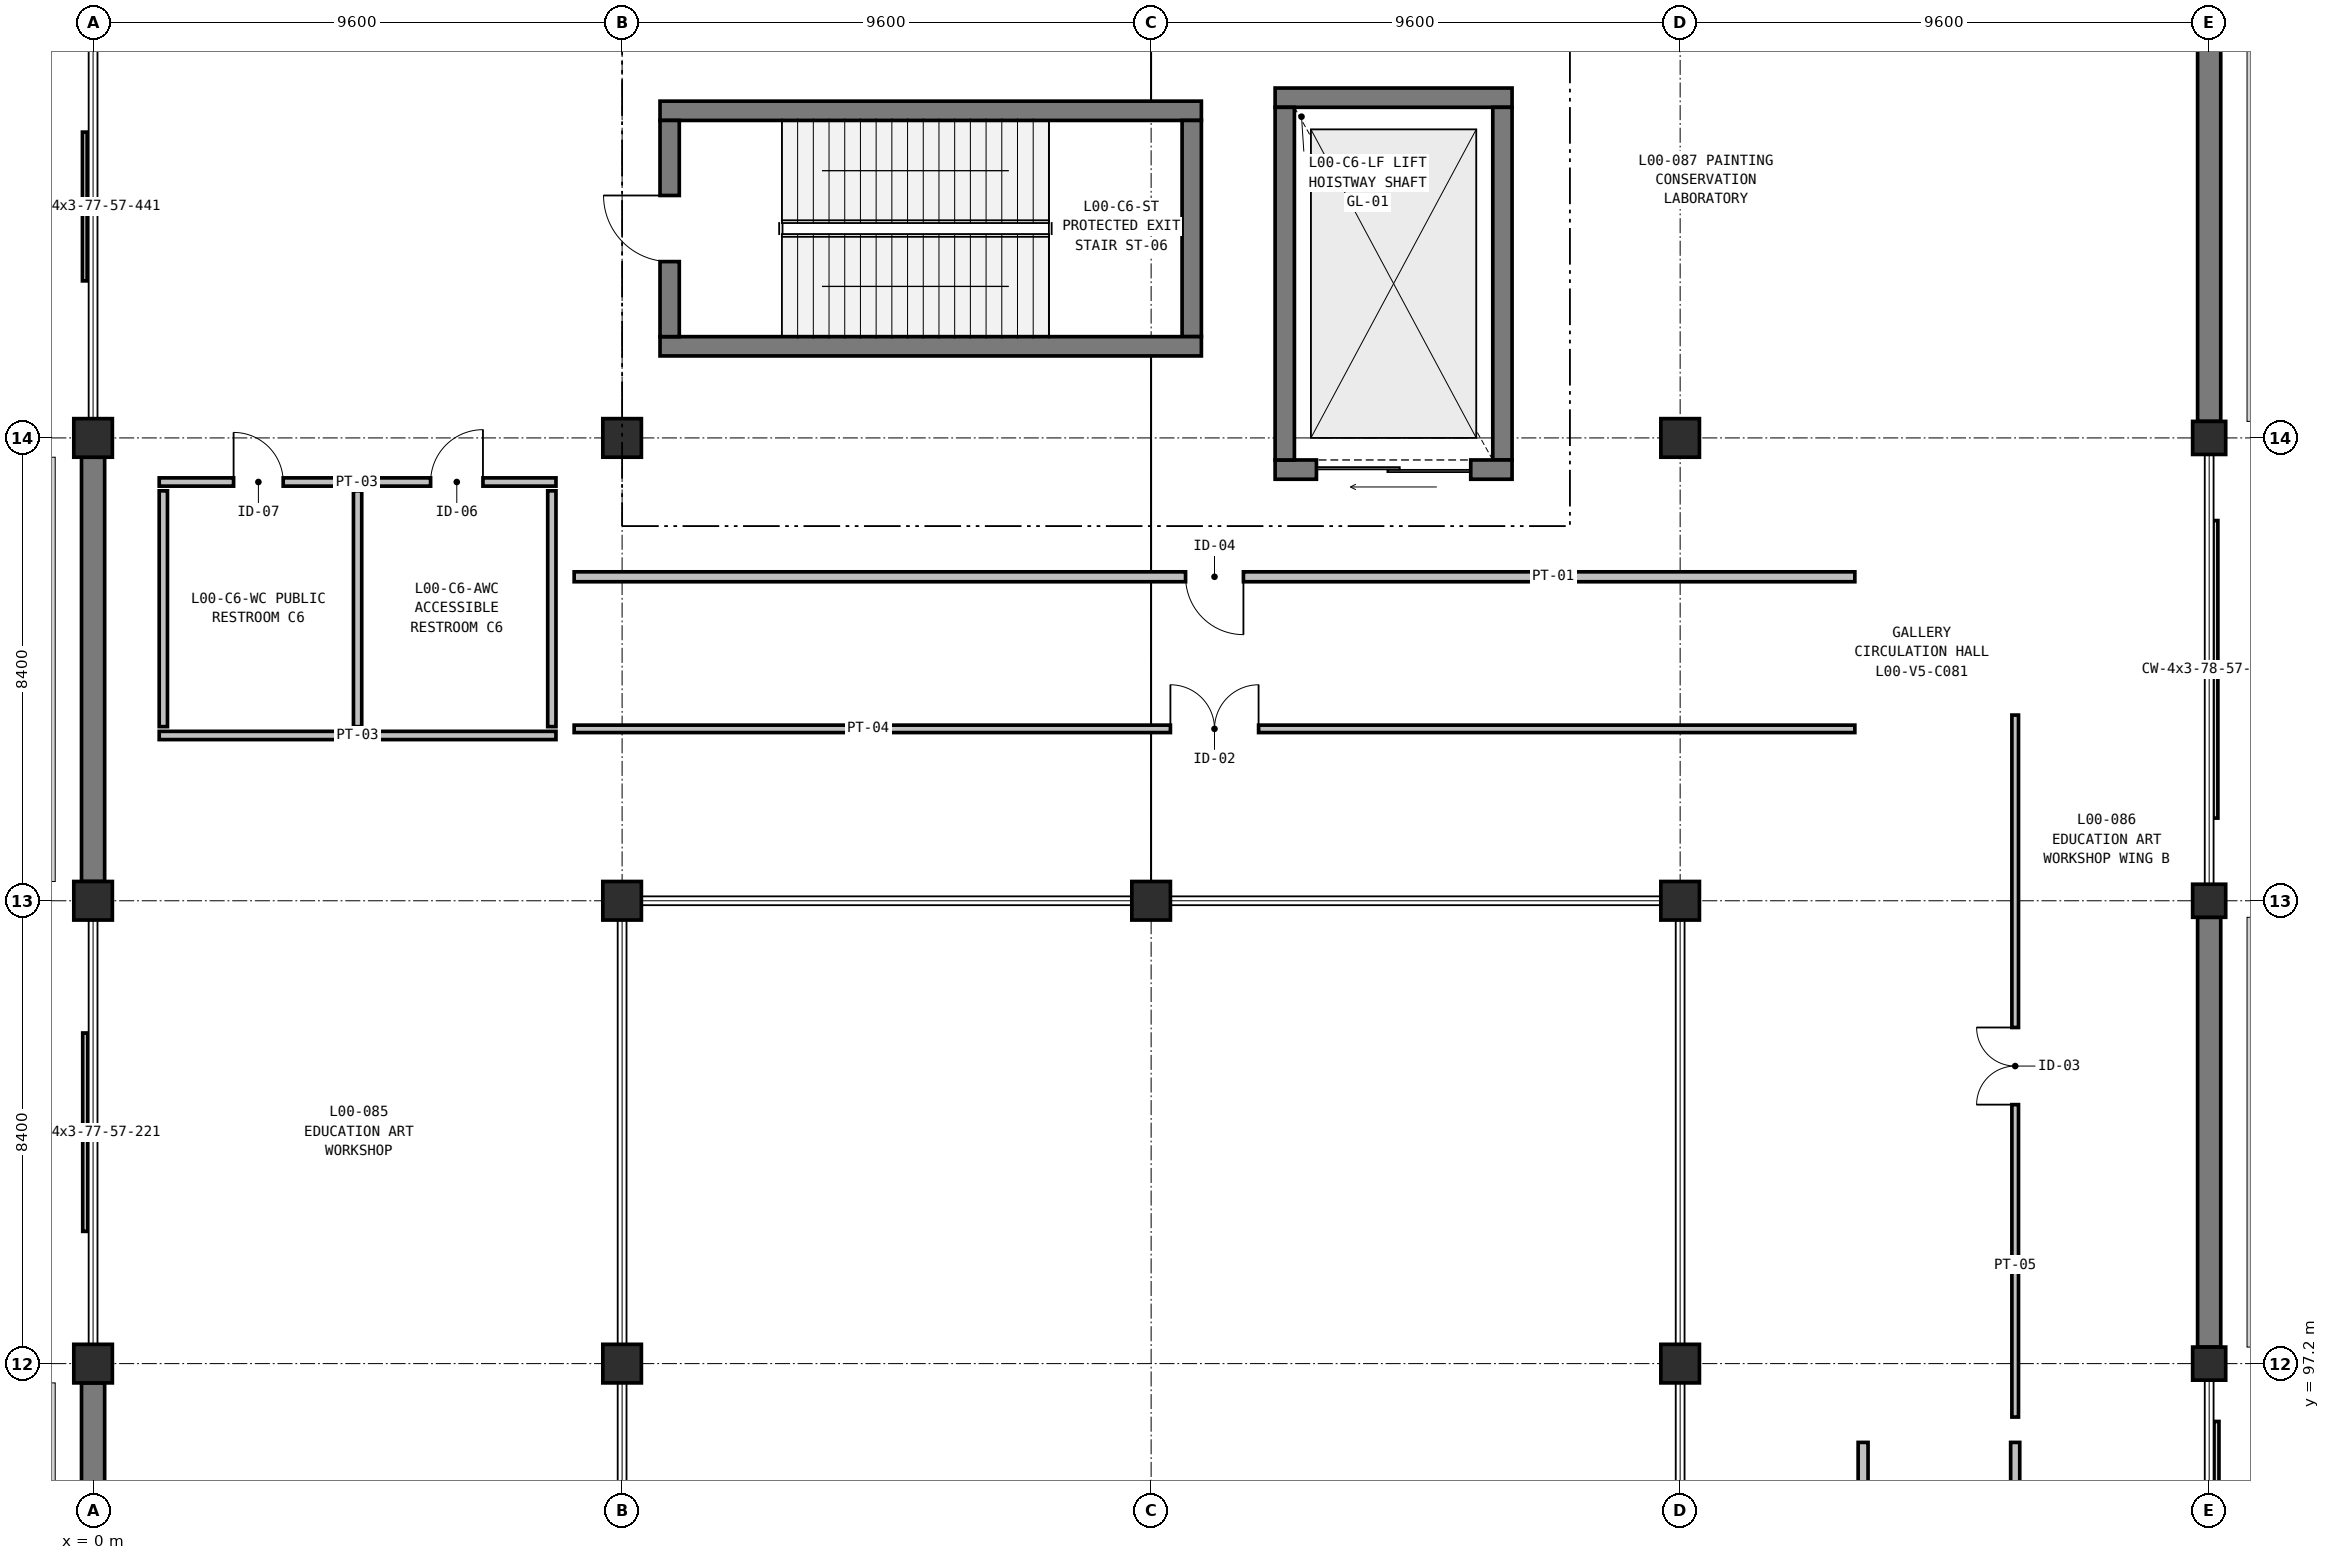
"""IFC4 building model, lengths in metres.
Left out: names, types, materials, properties, quantities, classifications, styles, units other than length and angle.
Written with IfcOpenShell. Run it as: python <this file> out.ifc"""

import sys

from ifc_helpers import new_model, si_unit, direction, frame, frame_2d, origin, origin_2d, place, context, subcontext, project, spatial, rectangle, extrude, element, fill, save


model = new_model("IFC4")
c1 = context("Model", 3, precision=1e-05, world=origin(), true_north=direction((0.0, 1.0)))
c2 = subcontext(c1, "Body", "Model", "MODEL_VIEW")
j1 = project(units=[si_unit("LENGTHUNIT", "METRE"), si_unit("PLANEANGLEUNIT", "RADIAN")], contexts=[c1])
p1 = place(None, origin())
s1 = spatial("IfcSite", under=j1, at=p1, CompositionType="ELEMENT")
p2 = place(p1, origin())
s2 = spatial("IfcBuilding", under=s1, at=p2, CompositionType="ELEMENT")
p3 = place(p2, origin())
s3 = spatial("IfcBuildingStorey", under=s2, at=p3, CompositionType="ELEMENT", Elevation=0.0)
for number, where, z_axis, x_axis in (
    (1, (0.0, 97.2, 0.0), (0.0, 0.0, 1.0), (1.0, 0.0, 0.0)),
    (2, (0.0, 105.6, 0.0), (0.0, 0.0, 1.0), (1.0, 0.0, 0.0)),
    (3, (0.0, 114.0, 0.0), (0.0, 0.0, 1.0), (1.0, 0.0, 0.0)),
    (4, (9.6, 97.2, 0.0), (0.0, 0.0, 1.0), (1.0, 0.0, 0.0)),
    (5, (9.6, 105.6, 0.0), (0.0, 0.0, 1.0), (1.0, 0.0, 0.0)),
    (6, (9.6, 114.0, 0.0), (0.0, 0.0, 1.0), (1.0, 0.0, 0.0)),
    (7, (19.2, 105.6, 0.0), (0.0, 0.0, 1.0), (1.0, 0.0, 0.0)),
    (8, (28.8, 97.2, 0.0), (0.0, 0.0, 1.0), (1.0, 0.0, 0.0)),
    (9, (28.8, 105.6, 0.0), (0.0, 0.0, 1.0), (1.0, 0.0, 0.0)),
    (10, (28.8, 114.0, 0.0), (0.0, 0.0, 1.0), (1.0, 0.0, 0.0)),
):
    element("IfcColumn", number, at=place(p3, frame(where, z_axis=z_axis, x_axis=x_axis)), inside=s3, PredefinedType="COLUMN", context=c2, shape_type="SweptSolid", body=[
        extrude(rectangle(XDim=0.7, YDim=0.7, at=origin_2d()), origin(), (0.0, 0.0, 1.0), 6.0),
    ])
for number, where, z_axis, x_axis in (
    (11, (38.4, 97.2, 0.0), (0.0, 0.0, 1.0), (1.0, 0.0, 0.0)),
    (12, (38.4, 105.6, 0.0), (0.0, 0.0, 1.0), (1.0, 0.0, 0.0)),
    (13, (38.4, 114.0, 0.0), (0.0, 0.0, 1.0), (1.0, 0.0, 0.0)),
):
    element("IfcColumn", number, at=place(p3, frame(where, z_axis=z_axis, x_axis=x_axis)), inside=s3, PredefinedType="COLUMN", context=c2, shape_type="SweptSolid", body=[
        extrude(rectangle(XDim=0.6, YDim=0.6, at=origin_2d()), origin(), (0.0, 0.0, 1.0), 6.0),
    ])
for number, where, z_axis, x_axis in (
    (14, (38.4, 122.1, 0.0), (0.0, 0.0, 1.0), (0.0, -1.0, 0.0)),
    (15, (38.4, 105.3, 0.0), (0.0, 0.0, 1.0), (0.0, -1.0, 0.0)),
):
    element("IfcWall", number, at=place(p3, frame(where, z_axis=z_axis, x_axis=x_axis)), inside=s3, PredefinedType="SOLIDWALL", context=c2, shape_type="SweptSolid", body=[
        extrude(rectangle(XDim=7.8, YDim=0.42, at=frame_2d((3.9, 0.0))), origin(), (0.0, 0.0, 1.0), 5.68),
    ])
p4 = place(p3, frame((0.0, 89.15, 0.0), z_axis=(0.0, 0.0, 1.0), x_axis=(0.0, 1.0, 0.0)))
e16 = element("IfcWall", 16, at=p4, inside=s3, PredefinedType="SOLIDWALL", context=c2, shape_type="SweptSolid", body=[
    extrude(rectangle(XDim=7.7, YDim=0.42, at=frame_2d((3.85, 0.0))), origin(), (0.0, 0.0, 1.0), 5.68),
])
p5 = place(p3, frame((0.0, 105.95, 0.0), z_axis=(0.0, 0.0, 1.0), x_axis=(0.0, 1.0, 0.0)))
e17 = element("IfcWall", 17, at=p5, inside=s3, PredefinedType="SOLIDWALL", context=c2, shape_type="SweptSolid", body=[
    extrude(rectangle(XDim=7.7, YDim=0.42, at=frame_2d((3.85, 0.0))), origin(), (0.0, 0.0, 1.0), 5.68),
])
p6 = place(p3, frame((10.288, 119.937, 0.0), z_axis=(0.0, 0.0, 1.0), x_axis=(1.0, 0.0, 0.0)))
e18 = element("IfcWall", 18, at=p6, inside=s3, PredefinedType="SHEAR", context=c2, shape_type="SweptSolid", body=[
    extrude(rectangle(XDim=9.824, YDim=0.35, at=frame_2d((4.912, 0.0))), origin(), (0.0, 0.0, 1.0), 5.68),
])
p7 = place(p3, frame((19.937, 119.762, 0.0), z_axis=(0.0, 0.0, 1.0), x_axis=(0.0, -1.0, 0.0)))
e19 = element("IfcWall", 19, at=p7, inside=s3, PredefinedType="SHEAR", context=c2, shape_type="SweptSolid", body=[
    extrude(rectangle(XDim=3.924, YDim=0.35, at=frame_2d((1.962, 0.0))), origin(), (0.0, 0.0, 1.0), 5.68),
])
p8 = place(p3, frame((20.112, 115.663, 0.0), z_axis=(0.0, 0.0, 1.0), x_axis=(-1.0, 0.0, 0.0)))
e20 = element("IfcWall", 20, at=p8, inside=s3, PredefinedType="SHEAR", context=c2, shape_type="SweptSolid", body=[
    extrude(rectangle(XDim=9.824, YDim=0.35, at=frame_2d((4.912, 0.0))), origin(), (0.0, 0.0, 1.0), 5.68),
])
p9 = place(p3, frame((10.463, 115.838, 0.0), z_axis=(0.0, 0.0, 1.0), x_axis=(0.0, 1.0, 0.0)))
e21 = element("IfcWall", 21, at=p9, inside=s3, PredefinedType="SHEAR", context=c2, shape_type="SweptSolid", body=[
    extrude(rectangle(XDim=3.924, YDim=0.35, at=frame_2d((1.962, 0.0))), origin(), (0.0, 0.0, 1.0), 5.68),
])
p10 = place(p9, frame((1.362, 0.0, 0.0)))
e22 = element("IfcOpeningElement", 22, at=p10, cuts=e21, PredefinedType="OPENING", context=c2, shape_type="SweptSolid", body=[
    extrude(rectangle(XDim=1.2, YDim=2.2, at=frame_2d((0.6, 1.1))), frame((0.0, 0.185, 0.0), z_axis=(0.0, -1.0, 0.0), x_axis=(1.0, 0.0, 0.0)), (0.0, 0.0, 1.0), 0.37),
])
p11 = place(p3, frame((21.45, 120.175, 0.0), z_axis=(0.0, 0.0, 1.0), x_axis=(1.0, 0.0, 0.0)))
e23 = element("IfcWall", 23, at=p11, inside=s3, PredefinedType="SHEAR", context=c2, shape_type="SweptSolid", body=[
    extrude(rectangle(XDim=4.3, YDim=0.35, at=frame_2d((2.15, 0.0))), origin(), (0.0, 0.0, 1.0), 5.68),
])
p12 = place(p3, frame((25.575, 120.0, 0.0), z_axis=(0.0, 0.0, 1.0), x_axis=(0.0, -1.0, 0.0)))
e24 = element("IfcWall", 24, at=p12, inside=s3, PredefinedType="SHEAR", context=c2, shape_type="SweptSolid", body=[
    extrude(rectangle(XDim=6.4, YDim=0.35, at=frame_2d((3.2, 0.0))), origin(), (0.0, 0.0, 1.0), 5.68),
])
p13 = place(p3, frame((25.75, 113.425, 0.0), z_axis=(0.0, 0.0, 1.0), x_axis=(-1.0, 0.0, 0.0)))
e25 = element("IfcWall", 25, at=p13, inside=s3, PredefinedType="SHEAR", context=c2, shape_type="SweptSolid", body=[
    extrude(rectangle(XDim=4.3, YDim=0.35, at=frame_2d((2.15, 0.0))), origin(), (0.0, 0.0, 1.0), 5.68),
])
p14 = place(p13, frame((0.75, 0.0, 0.0)))
e26 = element("IfcOpeningElement", 26, at=p14, cuts=e25, PredefinedType="OPENING", context=c2, shape_type="SweptSolid", body=[
    extrude(rectangle(XDim=2.8, YDim=2.7, at=frame_2d((1.4, 1.35))), frame((0.0, 0.185, 0.0), z_axis=(0.0, -1.0, 0.0), x_axis=(1.0, 0.0, 0.0)), (0.0, 0.0, 1.0), 0.37),
])
p15 = place(p3, frame((21.625, 113.6, 0.0), z_axis=(0.0, 0.0, 1.0), x_axis=(0.0, 1.0, 0.0)))
e27 = element("IfcWall", 27, at=p15, inside=s3, PredefinedType="SHEAR", context=c2, shape_type="SweptSolid", body=[
    extrude(rectangle(XDim=6.4, YDim=0.35, at=frame_2d((3.2, 0.0))), origin(), (0.0, 0.0, 1.0), 5.68),
])
p16 = place(p3, frame((1.2, 113.2, 0.0), z_axis=(0.0, 0.0, 1.0), x_axis=(1.0, 0.0, 0.0)))
e28 = element("IfcWall", 28, at=p16, inside=s3, PredefinedType="PARTITIONING", context=c2, shape_type="SweptSolid", body=[
    extrude(rectangle(XDim=7.2, YDim=0.15, at=frame_2d((3.6, 0.0))), origin(), (0.0, 0.0, 1.0), 5.68),
])
p17 = place(p16, frame((1.35, 0.0, 0.0)))
e29 = element("IfcOpeningElement", 29, at=p17, cuts=e28, PredefinedType="OPENING", context=c2, shape_type="SweptSolid", body=[
    extrude(rectangle(XDim=0.9, YDim=2.1, at=frame_2d((0.45, 1.05))), frame((0.0, 0.085, 0.0), z_axis=(0.0, -1.0, 0.0), x_axis=(1.0, 0.0, 0.0)), (0.0, 0.0, 1.0), 0.17),
])
p18 = place(p16, frame((4.925, 0.0, 0.0)))
e30 = element("IfcOpeningElement", 30, at=p18, cuts=e28, PredefinedType="OPENING", context=c2, shape_type="SweptSolid", body=[
    extrude(rectangle(XDim=0.95, YDim=2.15, at=frame_2d((0.475, 1.075))), frame((0.0, 0.085, 0.0), z_axis=(0.0, -1.0, 0.0), x_axis=(1.0, 0.0, 0.0)), (0.0, 0.0, 1.0), 0.17),
])
p19 = place(p3, frame((1.2, 108.6, 0.0), z_axis=(0.0, 0.0, 1.0), x_axis=(1.0, 0.0, 0.0)))
e31 = element("IfcWall", 31, at=p19, inside=s3, PredefinedType="PARTITIONING", context=c2, shape_type="SweptSolid", body=[
    extrude(rectangle(XDim=7.2, YDim=0.15, at=frame_2d((3.6, 0.0))), origin(), (0.0, 0.0, 1.0), 5.68),
])
for number, where, z_axis, x_axis in (
    (32, (1.275, 108.76, 0.0), (0.0, 0.0, 1.0), (0.0, 1.0, 0.0)),
    (33, (4.8, 108.76, 0.0), (0.0, 0.0, 1.0), (0.0, 1.0, 0.0)),
    (34, (8.325, 108.76, 0.0), (0.0, 0.0, 1.0), (0.0, 1.0, 0.0)),
):
    element("IfcWall", number, at=place(p3, frame(where, z_axis=z_axis, x_axis=x_axis)), inside=s3, PredefinedType="PARTITIONING", context=c2, shape_type="SweptSolid", body=[
        extrude(rectangle(XDim=4.28, YDim=0.15, at=frame_2d((2.14, 0.0))), origin(), (0.0, 0.0, 1.0), 5.055),
    ])
p20 = place(p3, frame((32.12, 95.77, 0.0), z_axis=(0.0, 0.0, 1.0), x_axis=(0.0, -1.0, 0.0)))
e35 = element("IfcWall", 35, at=p20, inside=s3, PredefinedType="PARTITIONING", context=c2, shape_type="SweptSolid", body=[
    extrude(rectangle(XDim=12.74, YDim=0.18, at=frame_2d((6.37, 0.0))), origin(), (0.0, 0.0, 1.0), 4.905),
])
p21 = place(p20, frame((5.795, 0.0, 0.0)))
e36 = element("IfcOpeningElement", 36, at=p21, cuts=e35, PredefinedType="OPENING", context=c2, shape_type="SweptSolid", body=[
    extrude(rectangle(XDim=1.15, YDim=2.2, at=frame_2d((0.575, 1.1))), frame((0.0, 0.1, 0.0), z_axis=(0.0, -1.0, 0.0), x_axis=(1.0, 0.0, 0.0)), (0.0, 0.0, 1.0), 0.2),
])
p22 = place(p3, frame((34.88, 83.03, 0.0), z_axis=(0.0, 0.0, 1.0), x_axis=(0.0, 1.0, 0.0)))
e37 = element("IfcWall", 37, at=p22, inside=s3, PredefinedType="PARTITIONING", context=c2, shape_type="SweptSolid", body=[
    extrude(rectangle(XDim=12.74, YDim=0.165, at=frame_2d((6.37, 0.0))), origin(), (0.0, 0.0, 1.0), 4.905),
])
p23 = place(p22, frame((5.47, 0.0, 0.0)))
e38 = element("IfcOpeningElement", 38, at=p23, cuts=e37, PredefinedType="OPENING", context=c2, shape_type="SweptSolid", body=[
    extrude(rectangle(XDim=1.8, YDim=2.4, at=frame_2d((0.9, 1.2))), frame((0.0, 0.093, 0.0), z_axis=(0.0, -1.0, 0.0), x_axis=(1.0, 0.0, 0.0)), (0.0, 0.0, 1.0), 0.185),
])
p24 = place(p3, frame((8.73, 108.72, 0.0), z_axis=(0.0, 0.0, 1.0), x_axis=(1.0, 0.0, 0.0)))
e39 = element("IfcWall", 39, at=p24, inside=s3, PredefinedType="PARTITIONING", context=c2, shape_type="SweptSolid", body=[
    extrude(rectangle(XDim=23.24, YDim=0.135, at=frame_2d((11.62, 0.0))), origin(), (0.0, 0.0, 1.0), 4.955),
])
p25 = place(p24, frame((10.82, 0.0, 0.0)))
e40 = element("IfcOpeningElement", 40, at=p25, cuts=e39, PredefinedType="OPENING", context=c2, shape_type="SweptSolid", body=[
    extrude(rectangle(XDim=1.6, YDim=2.35, at=frame_2d((0.8, 1.175))), frame((0.0, 0.077, 0.0), z_axis=(0.0, -1.0, 0.0), x_axis=(1.0, 0.0, 0.0)), (0.0, 0.0, 1.0), 0.155),
])
p26 = place(p3, frame((34.88, 96.23, 0.0), z_axis=(0.0, 0.0, 1.0), x_axis=(0.0, 1.0, 0.0)))
e41 = element("IfcWall", 41, at=p26, inside=s3, PredefinedType="PARTITIONING", context=c2, shape_type="SweptSolid", body=[
    extrude(rectangle(XDim=12.74, YDim=0.12, at=frame_2d((6.37, 0.0))), origin(), (0.0, 0.0, 1.0), 4.905),
])
p27 = place(p26, frame((5.67, 0.0, 0.0)))
e42 = element("IfcOpeningElement", 42, at=p27, cuts=e41, PredefinedType="OPENING", context=c2, shape_type="SweptSolid", body=[
    extrude(rectangle(XDim=1.4, YDim=2.3, at=frame_2d((0.7, 1.15))), frame((0.0, 0.07, 0.0), z_axis=(0.0, -1.0, 0.0), x_axis=(1.0, 0.0, 0.0)), (0.0, 0.0, 1.0), 0.14),
])
p28 = place(p3, frame((31.97, 111.48, 0.0), z_axis=(0.0, 0.0, 1.0), x_axis=(-1.0, 0.0, 0.0)))
e43 = element("IfcWall", 43, at=p28, inside=s3, PredefinedType="PARTITIONING", context=c2, shape_type="SweptSolid", body=[
    extrude(rectangle(XDim=23.24, YDim=0.18, at=frame_2d((11.62, 0.0))), origin(), (0.0, 0.0, 1.0), 4.955),
])
p29 = place(p28, frame((11.095, 0.0, 0.0)))
e44 = element("IfcOpeningElement", 44, at=p29, cuts=e43, PredefinedType="OPENING", context=c2, shape_type="SweptSolid", body=[
    extrude(rectangle(XDim=1.05, YDim=2.2, at=frame_2d((0.525, 1.1))), frame((0.0, 0.1, 0.0), z_axis=(0.0, -1.0, 0.0), x_axis=(1.0, 0.0, 0.0)), (0.0, 0.0, 1.0), 0.2),
])
p30 = place(p10, origin())
e45 = element("IfcDoor", 45, at=p30, inside=s3, OperationType="SINGLE_SWING_RIGHT", PredefinedType="DOOR", context=c2, shape_type="SweptSolid", body=[
    extrude(rectangle(XDim=1.2, YDim=2.2, at=frame_2d((0.6, 1.1))), frame((0.0, 0.025, 0.0), z_axis=(0.0, -1.0, 0.0), x_axis=(1.0, 0.0, 0.0)), (0.0, 0.0, 1.0), 0.05),
])
fill(e22, e45)
p31 = place(p14, origin())
e46 = element("IfcDoor", 46, at=p31, inside=s3, OperationType="DOUBLE_DOOR_SLIDING", PredefinedType="DOOR", context=c2, shape_type="SweptSolid", body=[
    extrude(rectangle(XDim=2.8, YDim=2.7, at=frame_2d((1.4, 1.35))), frame((0.0, 0.025, 0.0), z_axis=(0.0, -1.0, 0.0), x_axis=(1.0, 0.0, 0.0)), (0.0, 0.0, 1.0), 0.05),
])
fill(e26, e46)
p32 = place(p17, origin())
e47 = element("IfcDoor", 47, at=p32, inside=s3, OperationType="SINGLE_SWING_LEFT", PredefinedType="DOOR", context=c2, shape_type="SweptSolid", body=[
    extrude(rectangle(XDim=0.9, YDim=2.1, at=frame_2d((0.45, 1.05))), frame((0.0, 0.025, 0.0), z_axis=(0.0, -1.0, 0.0), x_axis=(1.0, 0.0, 0.0)), (0.0, 0.0, 1.0), 0.05),
])
fill(e29, e47)
p33 = place(p18, origin())
e48 = element("IfcDoor", 48, at=p33, inside=s3, OperationType="SINGLE_SWING_RIGHT", PredefinedType="DOOR", context=c2, shape_type="SweptSolid", body=[
    extrude(rectangle(XDim=0.95, YDim=2.15, at=frame_2d((0.475, 1.075))), frame((0.0, 0.025, 0.0), z_axis=(0.0, -1.0, 0.0), x_axis=(1.0, 0.0, 0.0)), (0.0, 0.0, 1.0), 0.05),
])
fill(e30, e48)
p34 = place(p25, origin())
e49 = element("IfcDoor", 49, at=p34, inside=s3, OperationType="DOUBLE_DOOR_SINGLE_SWING", PredefinedType="DOOR", context=c2, shape_type="SweptSolid", body=[
    extrude(rectangle(XDim=1.6, YDim=2.35, at=frame_2d((0.8, 1.175))), frame((0.0, 0.025, 0.0), z_axis=(0.0, -1.0, 0.0), x_axis=(1.0, 0.0, 0.0)), (0.0, 0.0, 1.0), 0.05),
])
fill(e40, e49)
p35 = place(p27, origin())
e50 = element("IfcDoor", 50, at=p35, inside=s3, OperationType="DOUBLE_DOOR_SINGLE_SWING", PredefinedType="DOOR", context=c2, shape_type="SweptSolid", body=[
    extrude(rectangle(XDim=1.4, YDim=2.3, at=frame_2d((0.7, 1.15))), frame((0.0, 0.025, 0.0), z_axis=(0.0, -1.0, 0.0), x_axis=(1.0, 0.0, 0.0)), (0.0, 0.0, 1.0), 0.05),
])
fill(e42, e50)
p36 = place(p29, origin())
e51 = element("IfcDoor", 51, at=p36, inside=s3, OperationType="SINGLE_SWING_LEFT", PredefinedType="DOOR", context=c2, shape_type="SweptSolid", body=[
    extrude(rectangle(XDim=1.05, YDim=2.2, at=frame_2d((0.525, 1.1))), frame((0.0, 0.025, 0.0), z_axis=(0.0, -1.0, 0.0), x_axis=(1.0, 0.0, 0.0)), (0.0, 0.0, 1.0), 0.05),
])
fill(e44, e51)
save(model, sys.argv[1])
